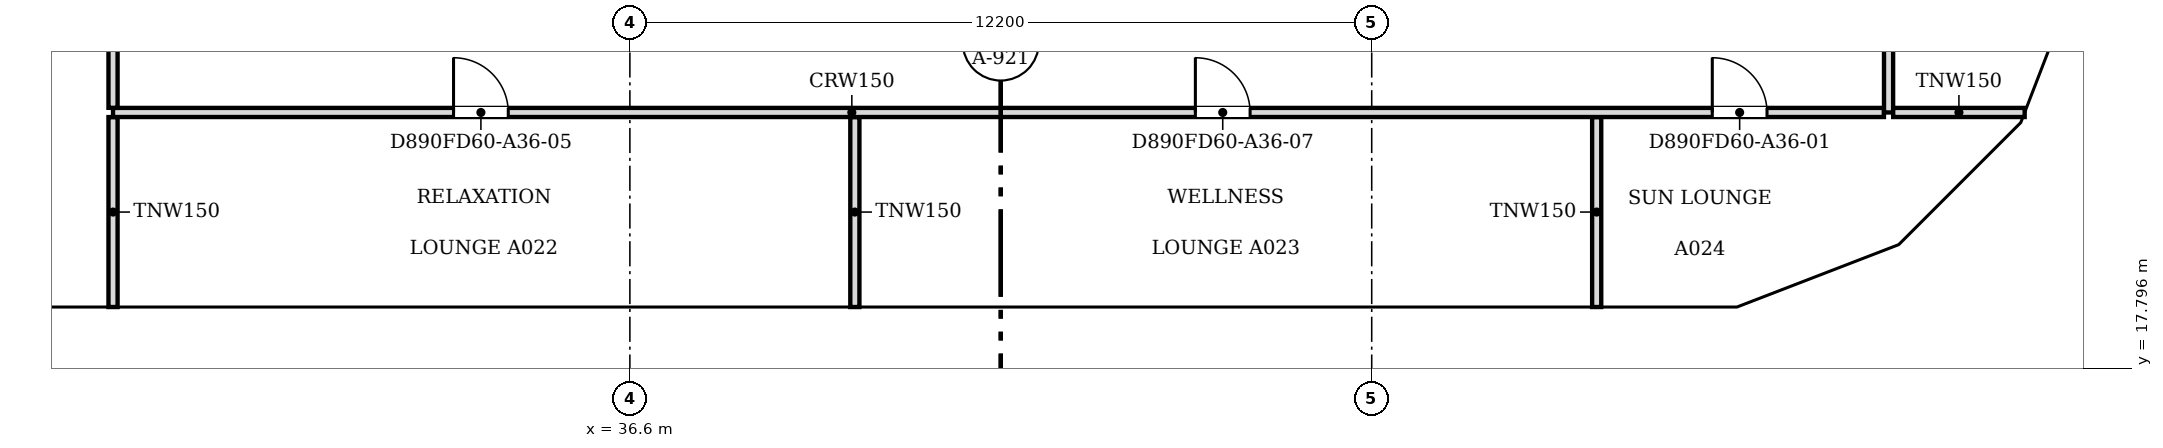
"""IFC4 building model, lengths in metres.
Left out: names, types, materials, properties, quantities, classifications, styles, units other than length and angle.
Written with IfcOpenShell. Run it as: python <this file> out.ifc"""

import sys

from ifc_helpers import new_model, si_unit, direction, frame, frame_2d, origin, place, context, subcontext, project, spatial, polyline, rectangle, outline, extrude, faceted_brep, source, transform, mapped, element, fill, save


model = new_model("IFC4")
c1 = context("Model", 3, precision=1e-05, world=origin(), true_north=direction((0.0, 1.0)))
c2 = subcontext(c1, "Body", "Model", "MODEL_VIEW")
j1 = project(units=[si_unit("LENGTHUNIT", "METRE"), si_unit("PLANEANGLEUNIT", "RADIAN")], contexts=[c1])
p1 = place(None, origin())
s1 = spatial("IfcSite", under=j1, at=p1, CompositionType="ELEMENT")
p2 = place(p1, origin())
s2 = spatial("IfcBuilding", under=s1, at=p2, CompositionType="ELEMENT")
p3 = place(p2, frame((0.0, 0.0, 236.9)))
s3 = spatial("IfcBuildingStorey", under=s2, at=p3, CompositionType="ELEMENT", Elevation=236.9)
m1 = source(origin(), c2, "Body", "Brep", [
    faceted_brep([(6.1, -0.25, 0.0), (3.05, -0.25, 3.8), (0.0, -0.25, 0.0), (6.1, -0.25, 0.0), (0.0, 0.25, 0.0), (3.05, 0.25, 3.8), (6.1, 0.25, 0.0), (6.1, 0.25, 0.0)], [[[0, 1, 2, 3]], [[4, 5, 6, 7]], [[6, 5, 1, 0]], [[5, 4, 2, 1]], [[4, 7, 3, 2]], [[3, 7, 6, 0]]]),
])
p4 = place(p3, frame((21.35, 18.55, 0.0), z_axis=(0.0, 0.0, 1.0), x_axis=(1.0, 0.0, 0.0)))
e1 = element("IfcWall", 1, at=p4, inside=s3, PredefinedType="SOLIDWALL", context=c2, shape_type="MappedRepresentation", body=[
    mapped(m1, transform((0.0, 0.0, 0.0), scale=1.0)),
])
m2 = source(origin(), c2, "Body", "SweptSolid", [
    extrude(outline(polyline([(5.579, 0.25), (3.05, 3.401), (0.521, 0.25), (5.579, 0.25)])), frame((0.0, 0.26, 0.0), z_axis=(0.0, -1.0, 0.0), x_axis=(1.0, 0.0, 0.0)), (0.0, 0.0, 1.0), 0.52),
])
p5 = place(p4, origin())
e2 = element("IfcOpeningElement", 2, at=p5, cuts=e1, PredefinedType="OPENING", context=c2, shape_type="MappedRepresentation", body=[
    mapped(m2, transform((0.0, 0.0, 0.0), scale=1.0)),
])
m3 = source(origin(), c2, "Body", "SweptSolid", [
    extrude(outline(polyline([(6.1, 0.0), (3.05, 3.8), (0.0, 0.0), (6.1, 0.0)])), frame((0.0, 0.25, 0.0), z_axis=(0.0, -1.0, 0.0), x_axis=(1.0, 0.0, 0.0)), (0.0, 0.0, 1.0), 0.5),
])
p6 = place(p3, frame((27.45, 18.55, 0.0), z_axis=(0.0, 0.0, 1.0), x_axis=(1.0, 0.0, 0.0)))
e3 = element("IfcWall", 3, at=p6, inside=s3, PredefinedType="SOLIDWALL", context=c2, shape_type="MappedRepresentation", body=[
    mapped(m3, transform((0.0, 0.0, 0.0), scale=1.0)),
])
p7 = place(p6, origin())
e4 = element("IfcOpeningElement", 4, at=p7, cuts=e3, PredefinedType="OPENING", context=c2, shape_type="MappedRepresentation", body=[
    mapped(m2, transform((0.0, 0.0, 0.0), scale=1.0)),
])
p8 = place(p3, frame((33.55, 18.55, 0.0), z_axis=(0.0, 0.0, 1.0), x_axis=(1.0, 0.0, 0.0)))
e5 = element("IfcWall", 5, at=p8, inside=s3, PredefinedType="SOLIDWALL", context=c2, shape_type="MappedRepresentation", body=[
    mapped(m1, transform((0.0, 0.0, 0.0), scale=1.0)),
])
p9 = place(p8, origin())
e6 = element("IfcOpeningElement", 6, at=p9, cuts=e5, PredefinedType="OPENING", context=c2, shape_type="MappedRepresentation", body=[
    mapped(m2, transform((0.0, 0.0, 0.0), scale=1.0)),
])
p10 = place(p3, frame((39.65, 18.55, 0.0), z_axis=(0.0, 0.0, 1.0), x_axis=(1.0, 0.0, 0.0)))
e7 = element("IfcWall", 7, at=p10, inside=s3, PredefinedType="SOLIDWALL", context=c2, shape_type="MappedRepresentation", body=[
    mapped(m3, transform((0.0, 0.0, 0.0), scale=1.0)),
])
p11 = place(p10, origin())
e8 = element("IfcOpeningElement", 8, at=p11, cuts=e7, PredefinedType="OPENING", context=c2, shape_type="MappedRepresentation", body=[
    mapped(m2, transform((0.0, 0.0, 0.0), scale=1.0)),
])
p12 = place(p3, frame((45.75, 18.55, 0.0), z_axis=(0.0, 0.0, 1.0), x_axis=(1.0, 0.0, 0.0)))
e9 = element("IfcWall", 9, at=p12, inside=s3, PredefinedType="SOLIDWALL", context=c2, shape_type="MappedRepresentation", body=[
    mapped(m3, transform((0.0, 0.0, 0.0), scale=1.0)),
])
p13 = place(p12, origin())
e10 = element("IfcOpeningElement", 10, at=p13, cuts=e9, PredefinedType="OPENING", context=c2, shape_type="MappedRepresentation", body=[
    mapped(m2, transform((0.0, 0.0, 0.0), scale=1.0)),
])
m4 = source(origin(), c2, "Body", "Brep", [
    faceted_brep([(3.05, -0.25, 3.74), (3.003, -0.25, 3.8), (0.0, -0.25, 0.0), (3.05, -0.25, 0.0), (0.0, 0.25, 0.0), (2.957, 0.25, 3.741), (2.957, 0.25, 0.0), (3.003, 0.0, 3.8)], [[[0, 1, 2, 3]], [[4, 5, 6]], [[7, 1, 0]], [[5, 4, 2, 1, 7]], [[4, 6, 3, 2]], [[3, 6, 5, 7, 0]]]),
])
p14 = place(p3, frame((51.85, 18.55, 0.0), z_axis=(0.0, 0.0, 1.0), x_axis=(1.0, 0.0, 0.0)))
e11 = element("IfcWall", 11, at=p14, inside=s3, PredefinedType="SOLIDWALL", context=c2, shape_type="MappedRepresentation", body=[
    mapped(m4, transform((0.0, 0.0, 0.0), scale=1.0)),
])
m5 = source(origin(), c2, "Body", "SweptSolid", [
    extrude(outline(polyline([(2.803, 3.144), (0.516, 0.25), (2.803, 0.25), (2.803, 3.144)])), frame((0.0, 0.26, 0.0), z_axis=(0.0, -1.0, 0.0), x_axis=(1.0, 0.0, 0.0)), (0.0, 0.0, 1.0), 0.52),
])
p15 = place(p14, origin())
e12 = element("IfcOpeningElement", 12, at=p15, cuts=e11, PredefinedType="OPENING", context=c2, shape_type="MappedRepresentation", body=[
    mapped(m5, transform((0.0, 0.0, 0.0), scale=1.0)),
])
m6 = source(origin(), c2, "Body", "Brep", [
    faceted_brep([(2.997, -0.25, 0.0), (0.047, -0.25, 3.8), (0.0, -0.25, 3.741), (0.0, -0.25, 0.0), (0.093, 0.25, 3.74), (2.944, 0.25, 0.068), (2.944, 0.25, 0.0), (0.093, 0.25, 0.0), (0.047, 0.0, 3.8), (2.997, 0.0, 0.0)], [[[0, 1, 2, 3]], [[4, 5, 6, 7]], [[5, 4, 8, 1, 0, 9]], [[2, 1, 8]], [[7, 6, 9, 0, 3]], [[7, 3, 2, 8, 4]], [[9, 6, 5]]]),
])
p16 = place(p3, frame((54.81, 18.533, 0.0), z_axis=(0.0, 0.0, 1.0), x_axis=(0.932990326376, 0.359901446078, 0.0)))
e13 = element("IfcWall", 13, at=p16, inside=s3, PredefinedType="SOLIDWALL", context=c2, shape_type="MappedRepresentation", body=[
    mapped(m6, transform((0.0, 0.0, 0.0), scale=1.0)),
])
m7 = source(origin(), c2, "Body", "SweptSolid", [
    extrude(outline(polyline([(2.487, 0.25), (0.247, 3.135), (0.247, 0.25), (2.487, 0.25)])), frame((0.0, 0.26, 0.0), z_axis=(0.0, -1.0, 0.0), x_axis=(1.0, 0.0, 0.0)), (0.0, 0.0, 1.0), 0.52),
])
p17 = place(p16, origin())
e14 = element("IfcOpeningElement", 14, at=p17, cuts=e13, PredefinedType="OPENING", context=c2, shape_type="MappedRepresentation", body=[
    mapped(m7, transform((0.0, 0.0, 0.0), scale=1.0)),
])
m8 = source(origin(), c2, "Body", "Brep", [
    faceted_brep([(2.997, -0.25, 3.732), (2.944, -0.25, 3.8), (0.0, -0.25, 0.0), (2.997, -0.25, 0.0), (0.053, 0.25, 0.068), (2.891, 0.25, 3.732), (2.891, 0.25, 0.0), (0.053, 0.25, 0.0), (2.944, 0.0, 3.8), (0.0, 0.0, 0.0)], [[[0, 1, 2, 3]], [[4, 5, 6, 7]], [[8, 1, 0]], [[5, 4, 9, 2, 1, 8]], [[7, 6, 3, 2, 9]], [[7, 9, 4]], [[3, 6, 5, 8, 0]]]),
])
p18 = place(p3, frame((57.606, 19.612, 0.0), z_axis=(0.0, 0.0, 1.0), x_axis=(0.707106781187, 0.707106781187, 0.0)))
e15 = element("IfcWall", 15, at=p18, inside=s3, PredefinedType="SOLIDWALL", context=c2, shape_type="MappedRepresentation", body=[
    mapped(m8, transform((0.0, 0.0, 0.0), scale=1.0)),
])
m9 = source(origin(), c2, "Body", "SweptSolid", [
    extrude(outline(polyline([(2.744, 3.134), (0.51, 0.25), (2.744, 0.25), (2.744, 3.134)])), frame((0.0, 0.26, 0.0), z_axis=(0.0, -1.0, 0.0), x_axis=(1.0, 0.0, 0.0)), (0.0, 0.0, 1.0), 0.52),
])
p19 = place(p18, origin())
e16 = element("IfcOpeningElement", 16, at=p19, cuts=e15, PredefinedType="OPENING", context=c2, shape_type="MappedRepresentation", body=[
    mapped(m9, transform((0.0, 0.0, 0.0), scale=1.0)),
])
m10 = source(origin(), c2, "Body", "Brep", [
    faceted_brep([(3.003, -0.25, 0.0), (0.053, -0.25, 3.8), (0.0, -0.25, 3.732), (0.0, -0.25, 0.0), (0.106, 0.25, 3.732), (2.957, 0.25, 0.06), (2.957, 0.25, 0.0), (0.106, 0.25, 0.0), (0.053, 0.0, 3.8), (3.003, 0.0, 0.0)], [[[0, 1, 2, 3]], [[4, 5, 6, 7]], [[5, 4, 8, 1, 0, 9]], [[2, 1, 8]], [[7, 6, 9, 0, 3]], [[7, 3, 2, 8, 4]], [[9, 6, 5]]]),
])
p20 = place(p3, frame((59.669, 21.644, 0.0), z_axis=(0.0, 0.0, 1.0), x_axis=(0.35992665181, 0.932980602862, 0.0)))
e17 = element("IfcWall", 17, at=p20, inside=s3, PredefinedType="SOLIDWALL", context=c2, shape_type="MappedRepresentation", body=[
    mapped(m10, transform((0.0, 0.0, 0.0), scale=1.0)),
])
m11 = source(origin(), c2, "Body", "SweptSolid", [
    extrude(outline(polyline([(2.493, 0.25), (0.253, 3.135), (0.253, 0.25), (2.493, 0.25)])), frame((0.0, 0.26, 0.0), z_axis=(0.0, -1.0, 0.0), x_axis=(1.0, 0.0, 0.0)), (0.0, 0.0, 1.0), 0.52),
])
p21 = place(p20, origin())
e18 = element("IfcOpeningElement", 18, at=p21, cuts=e17, PredefinedType="OPENING", context=c2, shape_type="MappedRepresentation", body=[
    mapped(m11, transform((0.0, 0.0, 0.0), scale=1.0)),
])
p22 = place(p2, frame((0.0, 0.0, 240.7)))
s4 = spatial("IfcBuildingStorey", under=s2, at=p22, CompositionType="ELEMENT", Elevation=240.7)
m12 = source(origin(), c2, "Body", "SweptSolid", [
    extrude(outline(polyline([(3.05, 0.0), (6.1, 3.8), (3.05, 7.6), (0.0, 3.8), (3.05, 0.0)])), frame((0.0, 0.25, 0.0), z_axis=(0.0, -1.0, 0.0), x_axis=(1.0, 0.0, 0.0)), (0.0, 0.0, 1.0), 0.5),
])
p23 = place(p22, frame((24.4, 18.55, -3.8), z_axis=(0.0, 0.0, 1.0), x_axis=(1.0, 0.0, 0.0)))
e19 = element("IfcWall", 19, at=p23, inside=s4, PredefinedType="SOLIDWALL", context=c2, shape_type="MappedRepresentation", body=[
    mapped(m12, transform((0.0, 0.0, 0.0), scale=1.0)),
])
m13 = source(origin(), c2, "Body", "SweptSolid", [
    extrude(outline(polyline([(3.05, 0.399), (5.78, 3.8), (3.05, 7.201), (0.321, 3.8), (3.05, 0.399)])), frame((0.0, 0.26, 0.0), z_axis=(0.0, -1.0, 0.0), x_axis=(1.0, 0.0, 0.0)), (0.0, 0.0, 1.0), 0.52),
])
p24 = place(p23, origin())
e20 = element("IfcOpeningElement", 20, at=p24, cuts=e19, PredefinedType="OPENING", context=c2, shape_type="MappedRepresentation", body=[
    mapped(m13, transform((0.0, 0.0, 0.0), scale=1.0)),
])
p25 = place(p22, frame((30.5, 18.55, -3.8), z_axis=(0.0, 0.0, 1.0), x_axis=(1.0, 0.0, 0.0)))
e21 = element("IfcWall", 21, at=p25, inside=s4, PredefinedType="SOLIDWALL", context=c2, shape_type="MappedRepresentation", body=[
    mapped(m12, transform((0.0, 0.0, 0.0), scale=1.0)),
])
p26 = place(p25, origin())
e22 = element("IfcOpeningElement", 22, at=p26, cuts=e21, PredefinedType="OPENING", context=c2, shape_type="MappedRepresentation", body=[
    mapped(m13, transform((0.0, 0.0, 0.0), scale=1.0)),
])
m14 = source(origin(), c2, "Body", "Brep", [
    faceted_brep([(3.05, -0.25, 0.0), (6.1, -0.25, 3.8), (6.1, -0.25, 3.8), (3.05, -0.25, 7.6), (0.0, -0.25, 3.8), (0.0, 0.25, 3.8), (3.05, 0.25, 7.6), (6.1, 0.25, 3.8), (6.1, 0.25, 3.8), (3.05, 0.25, 0.0)], [[[0, 1, 2, 3, 4]], [[5, 6, 7, 8, 9]], [[9, 8, 1, 0]], [[7, 6, 3, 2]], [[6, 5, 4, 3]], [[5, 9, 0, 4]], [[1, 8, 7, 2]]]),
])
p27 = place(p22, frame((36.6, 18.55, -3.8), z_axis=(0.0, 0.0, 1.0), x_axis=(1.0, 0.0, 0.0)))
e23 = element("IfcWall", 23, at=p27, inside=s4, PredefinedType="SOLIDWALL", context=c2, shape_type="MappedRepresentation", body=[
    mapped(m14, transform((0.0, 0.0, 0.0), scale=1.0)),
])
p28 = place(p27, origin())
e24 = element("IfcOpeningElement", 24, at=p28, cuts=e23, PredefinedType="OPENING", context=c2, shape_type="MappedRepresentation", body=[
    mapped(m13, transform((0.0, 0.0, 0.0), scale=1.0)),
])
p29 = place(p22, frame((42.7, 18.55, -3.8), z_axis=(0.0, 0.0, 1.0), x_axis=(1.0, 0.0, 0.0)))
e25 = element("IfcWall", 25, at=p29, inside=s4, PredefinedType="SOLIDWALL", context=c2, shape_type="MappedRepresentation", body=[
    mapped(m12, transform((0.0, 0.0, 0.0), scale=1.0)),
])
p30 = place(p29, origin())
e26 = element("IfcOpeningElement", 26, at=p30, cuts=e25, PredefinedType="OPENING", context=c2, shape_type="MappedRepresentation", body=[
    mapped(m13, transform((0.0, 0.0, 0.0), scale=1.0)),
])
m15 = source(origin(), c2, "Body", "Brep", [
    faceted_brep([(3.05, -0.25, 0.0), (6.053, -0.25, 3.8), (3.05, -0.25, 7.6), (0.0, -0.25, 3.8), (0.0, 0.25, 3.8), (3.05, 0.25, 7.6), (6.007, 0.25, 3.859), (6.007, 0.25, 3.741), (3.05, 0.25, 0.0), (6.053, 0.0, 3.8)], [[[0, 1, 2, 3]], [[4, 5, 6, 7, 8]], [[8, 7, 9, 1, 0]], [[6, 5, 2, 1, 9]], [[5, 4, 3, 2]], [[4, 8, 0, 3]], [[9, 7, 6]]]),
])
p31 = place(p22, frame((48.8, 18.55, -3.8), z_axis=(0.0, 0.0, 1.0), x_axis=(1.0, 0.0, 0.0)))
e27 = element("IfcWall", 27, at=p31, inside=s4, PredefinedType="SOLIDWALL", context=c2, shape_type="MappedRepresentation", body=[
    mapped(m15, transform((0.0, 0.0, 0.0), scale=1.0)),
])
m16 = source(origin(), c2, "Body", "SweptSolid", [
    extrude(outline(polyline([(3.049, 0.401), (5.735, 3.8), (3.049, 7.199), (0.321, 3.8), (3.049, 0.401)])), frame((0.0, 0.26, 0.0), z_axis=(0.0, -1.0, 0.0), x_axis=(1.0, 0.0, 0.0)), (0.0, 0.0, 1.0), 0.52),
])
p32 = place(p31, origin())
e28 = element("IfcOpeningElement", 28, at=p32, cuts=e27, PredefinedType="OPENING", context=c2, shape_type="MappedRepresentation", body=[
    mapped(m16, transform((0.0, 0.0, 0.0), scale=1.0)),
])
m17 = source(origin(), c2, "Body", "Brep", [
    faceted_brep([(2.95, -0.25, 0.0), (3.003, -0.25, 0.068), (3.003, -0.25, 7.532), (2.95, -0.25, 7.6), (0.0, -0.25, 3.8), (0.047, 0.25, 3.86), (2.898, 0.25, 7.532), (2.898, 0.25, 0.068), (0.047, 0.25, 3.74), (2.95, 0.0, 0.0), (2.95, 0.0, 7.6), (0.0, 0.0, 3.8)], [[[0, 1, 2, 3, 4]], [[5, 6, 7, 8]], [[1, 0, 9]], [[10, 3, 2]], [[6, 5, 11, 4, 3, 10]], [[8, 7, 9, 0, 4, 11]], [[8, 11, 5]], [[1, 9, 7, 6, 10, 2]]]),
])
p33 = place(p22, frame((54.854, 18.55, -3.8), z_axis=(0.0, 0.0, 1.0), x_axis=(0.932997369089, 0.359883188373, 0.0)))
e29 = element("IfcWall", 29, at=p33, inside=s4, PredefinedType="SOLIDWALL", context=c2, shape_type="MappedRepresentation", body=[
    mapped(m17, transform((0.0, 0.0, 0.0), scale=1.0)),
])
m18 = source(origin(), c2, "Body", "SweptSolid", [
    extrude(outline(polyline([(2.75, 6.935), (0.316, 3.8), (2.75, 0.665), (2.75, 6.935)])), frame((0.0, 0.26, 0.0), z_axis=(0.0, -1.0, 0.0), x_axis=(1.0, 0.0, 0.0)), (0.0, 0.0, 1.0), 0.52),
])
p34 = place(p33, origin())
e30 = element("IfcOpeningElement", 30, at=p34, cuts=e29, PredefinedType="OPENING", context=c2, shape_type="MappedRepresentation", body=[
    mapped(m18, transform((0.0, 0.0, 0.0), scale=1.0)),
])
m19 = source(origin(), c2, "Body", "Brep", [
    faceted_brep([(0.053, -0.25, 0.0), (2.997, -0.25, 3.8), (0.053, -0.25, 7.6), (0.0, -0.25, 7.532), (0.0, -0.25, 0.068), (0.106, 0.25, 7.532), (2.944, 0.25, 3.868), (2.944, 0.25, 3.732), (0.106, 0.25, 0.068), (2.997, 0.0, 3.8), (0.053, 0.0, 0.0), (0.053, 0.0, 7.6)], [[[0, 1, 2, 3, 4]], [[5, 6, 7, 8]], [[8, 7, 9, 1, 0, 10]], [[6, 5, 11, 2, 1, 9]], [[3, 2, 11]], [[10, 0, 4]], [[8, 10, 4, 3, 11, 5]], [[9, 7, 6]]]),
])
p35 = place(p22, frame((57.569, 19.574, -3.8), z_axis=(0.0, 0.0, 1.0), x_axis=(0.707106781187, 0.707106781187, 0.0)))
e31 = element("IfcWall", 31, at=p35, inside=s4, PredefinedType="SOLIDWALL", context=c2, shape_type="MappedRepresentation", body=[
    mapped(m19, transform((0.0, 0.0, 0.0), scale=1.0)),
])
m20 = source(origin(), c2, "Body", "SweptSolid", [
    extrude(outline(polyline([(0.253, 0.667), (2.681, 3.8), (0.253, 6.934), (0.253, 0.667)])), frame((0.0, 0.26, 0.0), z_axis=(0.0, -1.0, 0.0), x_axis=(1.0, 0.0, 0.0)), (0.0, 0.0, 1.0), 0.52),
])
p36 = place(p35, origin())
e32 = element("IfcOpeningElement", 32, at=p36, cuts=e31, PredefinedType="OPENING", context=c2, shape_type="MappedRepresentation", body=[
    mapped(m20, transform((0.0, 0.0, 0.0), scale=1.0)),
])
m21 = source(origin(), c2, "Body", "Brep", [
    faceted_brep([(2.95, -0.25, 0.0), (2.997, -0.25, 0.059), (2.997, -0.25, 7.541), (2.95, -0.25, 7.6), (0.0, -0.25, 3.8), (0.053, 0.25, 3.868), (2.904, 0.25, 7.54), (2.904, 0.25, 0.06), (0.053, 0.25, 3.732), (2.95, 0.0, 0.0), (2.95, 0.0, 7.6), (0.0, 0.0, 3.8)], [[[0, 1, 2, 3, 4]], [[5, 6, 7, 8]], [[1, 0, 9]], [[10, 3, 2]], [[6, 5, 11, 4, 3, 10]], [[8, 7, 9, 0, 4, 11]], [[8, 11, 5]], [[1, 9, 7, 6, 10, 2]]]),
])
p37 = place(p22, frame((59.688, 21.694, -3.8), z_axis=(0.0, 0.0, 1.0), x_axis=(0.359972353723, 0.932962970624, 0.0)))
e33 = element("IfcWall", 33, at=p37, inside=s4, PredefinedType="SOLIDWALL", context=c2, shape_type="MappedRepresentation", body=[
    mapped(m21, transform((0.0, 0.0, 0.0), scale=1.0)),
])
p38 = place(p37, origin())
e34 = element("IfcOpeningElement", 34, at=p38, cuts=e33, PredefinedType="OPENING", context=c2, shape_type="MappedRepresentation", body=[
    mapped(m18, transform((0.0, 0.0, 0.0), scale=1.0)),
])
for number, where, z_axis, x_axis in (
    (35, (28.1, 18.8, 0.0), (0.0, 0.0, 1.0), (0.0, 1.0, 0.0)),
    (36, (40.3, 18.8, 0.0), (0.0, 0.0, 1.0), (0.0, 1.0, 0.0)),
    (37, (52.5, 18.8, 0.0), (0.0, 0.0, 1.0), (0.0, 1.0, 0.0)),
):
    element("IfcWall", number, at=place(p3, frame(where, z_axis=z_axis, x_axis=x_axis)), inside=s3, PredefinedType="PARTITIONING", context=c2, shape_type="SweptSolid", body=[
        extrude(rectangle(XDim=3.124, YDim=0.15, at=frame_2d((1.562, 0.0))), origin(), (0.0, 0.0, 1.0), 3.067),
    ])
p39 = place(p3, frame((57.224, 22.0, 0.0), z_axis=(0.0, 0.0, 1.0), x_axis=(-1.0, 0.0, 0.0)))
e38 = element("IfcWall", 38, at=p39, inside=s3, PredefinedType="PARTITIONING", context=c2, shape_type="SweptSolid", body=[
    extrude(rectangle(XDim=29.124, YDim=0.15, at=frame_2d((14.562, 0.0))), origin(), (0.0, 0.0, 1.0), 3.067),
])
m22 = source(origin(), c2, "Body", "SweptSolid", [
    extrude(rectangle(XDim=0.9, YDim=2.1, at=frame_2d((0.45, 1.05))), frame((0.0, 0.085, 0.0), z_axis=(0.0, -1.0, 0.0), x_axis=(1.0, 0.0, 0.0)), (0.0, 0.0, 1.0), 0.17),
])
p40 = place(p39, frame((1.923, 0.0, 0.0)))
e39 = element("IfcOpeningElement", 39, at=p40, cuts=e38, PredefinedType="OPENING", context=c2, shape_type="MappedRepresentation", body=[
    mapped(m22, transform((0.0, 0.0, 0.0), scale=1.0)),
])
p41 = place(p39, frame((22.624, 0.0, 0.0)))
e40 = element("IfcOpeningElement", 40, at=p41, cuts=e38, PredefinedType="OPENING", context=c2, shape_type="MappedRepresentation", body=[
    mapped(m22, transform((0.0, 0.0, 0.0), scale=1.0)),
])
p42 = place(p39, frame((10.424, 0.0, 0.0)))
e41 = element("IfcOpeningElement", 41, at=p42, cuts=e38, PredefinedType="OPENING", context=c2, shape_type="MappedRepresentation", body=[
    mapped(m22, transform((0.0, 0.0, 0.0), scale=1.0)),
])
p43 = place(p3, frame((57.3, 30.6, 0.0), z_axis=(0.0, 0.0, 1.0), x_axis=(0.0, -1.0, 0.0)))
e42 = element("IfcWall", 42, at=p43, inside=s3, PredefinedType="PARTITIONING", context=c2, shape_type="SweptSolid", body=[
    extrude(rectangle(XDim=8.6, YDim=0.15, at=frame_2d((4.3, 0.0))), origin(), (0.0, 0.0, 1.0), 3.067),
])
p44 = place(p43, frame((3.9, 0.0, 0.0)))
e43 = element("IfcOpeningElement", 43, at=p44, cuts=e42, PredefinedType="OPENING", context=c2, shape_type="MappedRepresentation", body=[
    mapped(m22, transform((0.0, 0.0, 0.0), scale=1.0)),
])
p45 = place(p3, frame((57.376, 22.0, 0.0), z_axis=(0.0, 0.0, 1.0), x_axis=(1.0, 0.0, 0.0)))
e44 = element("IfcWall", 44, at=p45, inside=s3, PredefinedType="PARTITIONING", context=c2, shape_type="SweptSolid", body=[
    extrude(rectangle(XDim=2.162, YDim=0.15, at=frame_2d((1.081, 0.0))), origin(), (0.0, 0.0, 1.0), 3.067),
])
p46 = place(p3, frame((28.1, 22.076, 0.0), z_axis=(0.0, 0.0, 1.0), x_axis=(0.0, 1.0, 0.0)))
e45 = element("IfcWall", 45, at=p46, inside=s3, PredefinedType="PARTITIONING", context=c2, shape_type="SweptSolid", body=[
    extrude(rectangle(XDim=23.148, YDim=0.15, at=frame_2d((11.574, 0.0))), origin(), (0.0, 0.0, 1.0), 3.067),
])
m23 = source(origin(), c2, "Body", "SweptSolid", [
    extrude(rectangle(XDim=1.8, YDim=2.1, at=frame_2d((0.9, 1.05))), frame((0.0, 0.085, 0.0), z_axis=(0.0, -1.0, 0.0), x_axis=(1.0, 0.0, 0.0)), (0.0, 0.0, 1.0), 0.17),
])
p47 = place(p46, frame((2.1, 0.0, 0.0)))
e46 = element("IfcOpeningElement", 46, at=p47, cuts=e45, PredefinedType="OPENING", context=c2, shape_type="MappedRepresentation", body=[
    mapped(m23, transform((0.0, 0.0, 0.0), scale=1.0)),
])
p48 = place(p46, frame((18.275, 0.0, 0.0)))
e47 = element("IfcOpeningElement", 47, at=p48, cuts=e45, PredefinedType="OPENING", context=c2, shape_type="MappedRepresentation", body=[
    mapped(m23, transform((0.0, 0.0, 0.0), scale=1.0)),
])
p49 = place(p46, frame((9.724, 0.0, 0.0)))
e48 = element("IfcOpeningElement", 48, at=p49, cuts=e45, PredefinedType="OPENING", context=c2, shape_type="MappedRepresentation", body=[
    mapped(m23, transform((0.0, 0.0, 0.0), scale=1.0)),
])
m24 = source(origin(), c2, "Body", "SweptSolid", [
    extrude(rectangle(XDim=0.9, YDim=2.1, at=frame_2d((0.45, 1.05))), frame((0.0, 0.025, 0.0), z_axis=(0.0, -1.0, 0.0), x_axis=(1.0, 0.0, 0.0)), (0.0, 0.0, 1.0), 0.05),
])
p50 = place(p40, origin())
e49 = element("IfcDoor", 49, at=p50, inside=s3, OperationType="SINGLE_SWING_RIGHT", PredefinedType="DOOR", context=c2, shape_type="MappedRepresentation", body=[
    mapped(m24, transform((0.0, 0.0, 0.0), scale=1.0)),
])
fill(e39, e49)
p51 = place(p41, origin())
e50 = element("IfcDoor", 50, at=p51, inside=s3, OperationType="SINGLE_SWING_RIGHT", PredefinedType="DOOR", context=c2, shape_type="MappedRepresentation", body=[
    mapped(m24, transform((0.0, 0.0, 0.0), scale=1.0)),
])
fill(e40, e50)
p52 = place(p42, origin())
e51 = element("IfcDoor", 51, at=p52, inside=s3, OperationType="SINGLE_SWING_RIGHT", PredefinedType="DOOR", context=c2, shape_type="MappedRepresentation", body=[
    mapped(m24, transform((0.0, 0.0, 0.0), scale=1.0)),
])
fill(e41, e51)
save(model, sys.argv[1])
